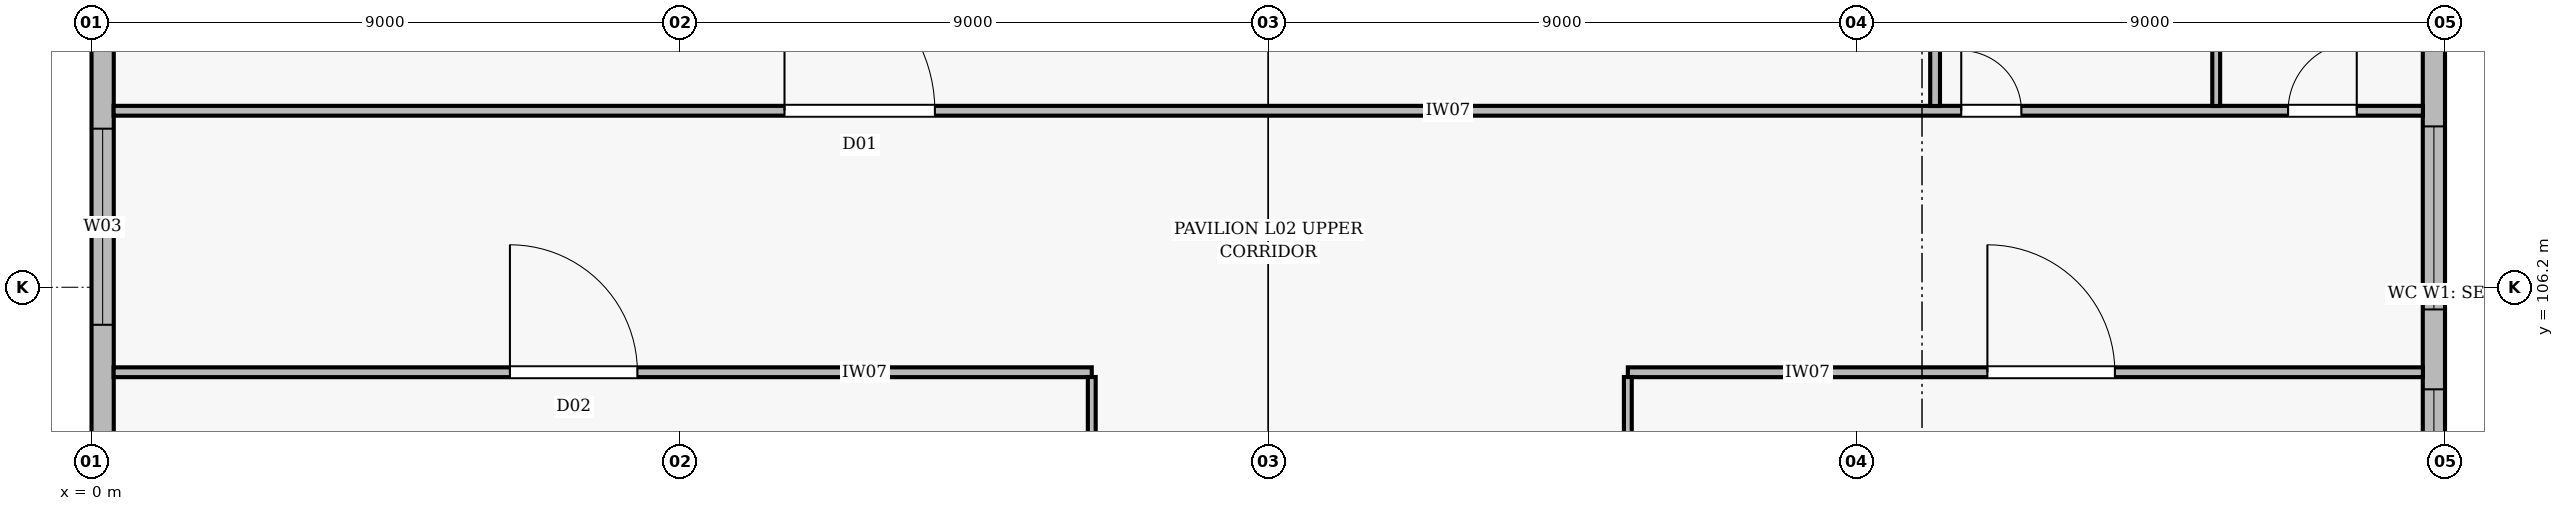
"""IFC4 building model, lengths in metres.
Left out: names, types, materials, properties, quantities, classifications, styles, units other than length and angle.
Written with IfcOpenShell. Run it as: python <this file> out.ifc"""

import sys

from ifc_helpers import new_model, si_unit, direction, frame, frame_2d, origin, place, context, subcontext, project, spatial, rectangle, extrude, element, fill, save


model = new_model("IFC4")
c1 = context("Model", 3, precision=1e-05, world=origin(), true_north=direction((0.0, 1.0)))
c2 = subcontext(c1, "Body", "Model", "MODEL_VIEW")
j1 = project(units=[si_unit("LENGTHUNIT", "METRE"), si_unit("PLANEANGLEUNIT", "RADIAN")], contexts=[c1])
p1 = place(None, origin())
s1 = spatial("IfcSite", under=j1, at=p1, CompositionType="ELEMENT")
p2 = place(p1, origin())
s2 = spatial("IfcBuilding", under=s1, at=p2, CompositionType="ELEMENT")
p3 = place(p2, frame((0.0, 0.0, 12.6)))
s3 = spatial("IfcBuildingStorey", under=s2, at=p3, CompositionType="ELEMENT", Elevation=12.6)
p4 = place(p3, frame((0.17, 100.948, 0.0), z_axis=(0.0, 0.0, 1.0), x_axis=(0.0, 1.0, 0.0)))
e1 = element("IfcWall", 1, at=p4, inside=s3, PredefinedType="STANDARD", context=c2, shape_type="SweptSolid", body=[
    extrude(rectangle(XDim=10.504, YDim=0.34, at=frame_2d((5.252, 0.0))), origin(), (0.0, 0.0, 1.0), 4.22),
])
p5 = place(p4, frame((1.026, 0.0, 0.75)))
e2 = element("IfcOpeningElement", 2, at=p5, cuts=e1, PredefinedType="OPENING", context=c2, shape_type="SweptSolid", body=[
    extrude(rectangle(XDim=1.2, YDim=1.8, at=frame_2d((0.6, 0.9))), frame((0.0, 0.182, 0.0), z_axis=(0.0, -1.0, 0.0), x_axis=(1.0, 0.0, 0.0)), (0.0, 0.0, 1.0), 0.364),
])
p6 = place(p4, frame((4.678, 0.0, 0.75)))
e3 = element("IfcOpeningElement", 3, at=p6, cuts=e1, PredefinedType="OPENING", context=c2, shape_type="SweptSolid", body=[
    extrude(rectangle(XDim=3.0, YDim=2.6, at=frame_2d((1.5, 1.3))), frame((0.0, 0.182, 0.0), z_axis=(0.0, -1.0, 0.0), x_axis=(1.0, 0.0, 0.0)), (0.0, 0.0, 1.0), 0.364),
])
p7 = place(p3, frame((35.83, 100.978, 0.0), z_axis=(0.0, 0.0, 1.0), x_axis=(0.0, 1.0, 0.0)))
e4 = element("IfcWall", 4, at=p7, inside=s3, PredefinedType="STANDARD", context=c2, shape_type="SweptSolid", body=[
    extrude(rectangle(XDim=10.444, YDim=0.34, at=frame_2d((5.222, 0.0))), origin(), (0.0, 0.0, 1.0), 4.22),
])
p8 = place(p7, frame((0.461, 0.0, 0.75)))
e5 = element("IfcOpeningElement", 5, at=p8, cuts=e4, PredefinedType="OPENING", context=c2, shape_type="SweptSolid", body=[
    extrude(rectangle(XDim=3.2, YDim=2.8, at=frame_2d((1.6, 1.4))), frame((0.0, 0.182, 0.0), z_axis=(0.0, -1.0, 0.0), x_axis=(1.0, 0.0, 0.0)), (0.0, 0.0, 1.0), 0.364),
])
p9 = place(p7, frame((4.883, 0.0, 0.75)))
e6 = element("IfcOpeningElement", 6, at=p9, cuts=e4, PredefinedType="OPENING", context=c2, shape_type="SweptSolid", body=[
    extrude(rectangle(XDim=2.8, YDim=2.6, at=frame_2d((1.4, 1.3))), frame((0.0, 0.182, 0.0), z_axis=(0.0, -1.0, 0.0), x_axis=(1.0, 0.0, 0.0)), (0.0, 0.0, 1.0), 0.364),
])
p10 = place(p3, frame((0.338, 104.9, 0.0), z_axis=(0.0, 0.0, 1.0), x_axis=(1.0, 0.0, 0.0)))
e7 = element("IfcWall", 7, at=p10, inside=s3, PredefinedType="PARTITIONING", context=c2, shape_type="SweptSolid", body=[
    extrude(rectangle(XDim=14.962, YDim=0.15, at=frame_2d((7.481, 0.0))), origin(), (0.0, 0.0, 1.0), 4.22),
])
p11 = place(p10, frame((6.062, 0.0, 0.005)))
e8 = element("IfcOpeningElement", 8, at=p11, cuts=e7, PredefinedType="OPENING", context=c2, shape_type="SweptSolid", body=[
    extrude(rectangle(XDim=1.95, YDim=2.3, at=frame_2d((0.975, 1.15))), frame((0.0, 0.087, 0.0), z_axis=(0.0, -1.0, 0.0), x_axis=(1.0, 0.0, 0.0)), (0.0, 0.0, 1.0), 0.174),
])
p12 = place(p3, frame((23.5, 104.9, 0.0), z_axis=(0.0, 0.0, 1.0), x_axis=(1.0, 0.0, 0.0)))
e9 = element("IfcWall", 9, at=p12, inside=s3, PredefinedType="PARTITIONING", context=c2, shape_type="SweptSolid", body=[
    extrude(rectangle(XDim=12.162, YDim=0.15, at=frame_2d((6.081, 0.0))), origin(), (0.0, 0.0, 1.0), 4.22),
])
p13 = place(p12, frame((5.5, 0.0, 0.005)))
e10 = element("IfcOpeningElement", 10, at=p13, cuts=e9, PredefinedType="OPENING", context=c2, shape_type="SweptSolid", body=[
    extrude(rectangle(XDim=1.95, YDim=2.3, at=frame_2d((0.975, 1.15))), frame((0.0, 0.087, 0.0), z_axis=(0.0, -1.0, 0.0), x_axis=(1.0, 0.0, 0.0)), (0.0, 0.0, 1.0), 0.174),
])
p14 = place(p3, frame((0.338, 108.9, 0.0), z_axis=(0.0, 0.0, 1.0), x_axis=(1.0, 0.0, 0.0)))
e11 = element("IfcWall", 11, at=p14, inside=s3, PredefinedType="PARTITIONING", context=c2, shape_type="SweptSolid", body=[
    extrude(rectangle(XDim=35.324, YDim=0.15, at=frame_2d((17.662, 0.0))), origin(), (0.0, 0.0, 1.0), 4.22),
])
p15 = place(p14, frame((10.262, 0.0, 0.005)))
e12 = element("IfcOpeningElement", 12, at=p15, cuts=e11, PredefinedType="OPENING", context=c2, shape_type="SweptSolid", body=[
    extrude(rectangle(XDim=2.3, YDim=2.4, at=frame_2d((1.15, 1.2))), frame((0.0, 0.087, 0.0), z_axis=(0.0, -1.0, 0.0), x_axis=(1.0, 0.0, 0.0)), (0.0, 0.0, 1.0), 0.174),
])
p16 = place(p14, frame((28.262, 0.0, 0.005)))
e13 = element("IfcOpeningElement", 13, at=p16, cuts=e11, PredefinedType="OPENING", context=c2, shape_type="SweptSolid", body=[
    extrude(rectangle(XDim=0.92, YDim=2.12, at=frame_2d((0.46, 1.06))), frame((0.0, 0.087, 0.0), z_axis=(0.0, -1.0, 0.0), x_axis=(1.0, 0.0, 0.0)), (0.0, 0.0, 1.0), 0.174),
])
p17 = place(p14, frame((33.262, 0.0, 0.005)))
e14 = element("IfcOpeningElement", 14, at=p17, cuts=e11, PredefinedType="OPENING", context=c2, shape_type="SweptSolid", body=[
    extrude(rectangle(XDim=1.05, YDim=2.15, at=frame_2d((0.525, 1.075))), frame((0.0, 0.087, 0.0), z_axis=(0.0, -1.0, 0.0), x_axis=(1.0, 0.0, 0.0)), (0.0, 0.0, 1.0), 0.174),
])
for number, where, z_axis, x_axis in (
    (15, (15.3, 90.238, 0.0), (0.0, 0.0, 1.0), (0.0, 1.0, 0.0)),
    (16, (23.5, 90.238, 0.0), (0.0, 0.0, 1.0), (0.0, 1.0, 0.0)),
):
    element("IfcWall", number, at=place(p3, frame(where, z_axis=z_axis, x_axis=x_axis)), inside=s3, PredefinedType="PARTITIONING", context=c2, shape_type="SweptSolid", body=[
        extrude(rectangle(XDim=14.589, YDim=0.12, at=frame_2d((7.294, 0.0))), origin(), (0.0, 0.0, 1.0), 4.22),
    ])
p18 = place(p3, frame((28.2, 108.973, 0.0), z_axis=(0.0, 0.0, 1.0), x_axis=(0.0, 1.0, 0.0)))
e17 = element("IfcWall", 17, at=p18, inside=s3, PredefinedType="PARTITIONING", context=c2, shape_type="SweptSolid", body=[
    extrude(rectangle(XDim=13.189, YDim=0.15, at=frame_2d((6.595, 0.0))), origin(), (0.0, 0.0, 1.0), 4.22),
])
p19 = place(p3, frame((32.5, 108.973, 0.0), z_axis=(0.0, 0.0, 1.0), x_axis=(0.0, 1.0, 0.0)))
e18 = element("IfcWall", 18, at=p19, inside=s3, PredefinedType="PARTITIONING", context=c2, shape_type="SweptSolid", body=[
    extrude(rectangle(XDim=13.189, YDim=0.12, at=frame_2d((6.595, 0.0))), origin(), (0.0, 0.0, 1.0), 4.22),
])
p20 = place(p6, origin())
e19 = element("IfcWindow", 19, at=p20, inside=s3, PartitioningType="DOUBLE_PANEL_VERTICAL", PredefinedType="WINDOW", context=c2, shape_type="SweptSolid", body=[
    extrude(rectangle(XDim=3.0, YDim=2.6, at=frame_2d((1.5, 1.3))), frame((0.0, 0.03, 0.0), z_axis=(0.0, -1.0, 0.0), x_axis=(1.0, 0.0, 0.0)), (0.0, 0.0, 1.0), 0.06),
])
fill(e3, e19)
p21 = place(p8, origin())
e20 = element("IfcWindow", 20, at=p21, inside=s3, PartitioningType="DOUBLE_PANEL_VERTICAL", PredefinedType="WINDOW", context=c2, shape_type="SweptSolid", body=[
    extrude(rectangle(XDim=3.2, YDim=2.8, at=frame_2d((1.6, 1.4))), frame((0.0, 0.03, 0.0), z_axis=(0.0, -1.0, 0.0), x_axis=(1.0, 0.0, 0.0)), (0.0, 0.0, 1.0), 0.06),
])
fill(e5, e20)
p22 = place(p9, origin())
e21 = element("IfcWindow", 21, at=p22, inside=s3, PartitioningType="DOUBLE_PANEL_VERTICAL", PredefinedType="WINDOW", context=c2, shape_type="SweptSolid", body=[
    extrude(rectangle(XDim=2.8, YDim=2.6, at=frame_2d((1.4, 1.3))), frame((0.0, 0.03, 0.0), z_axis=(0.0, -1.0, 0.0), x_axis=(1.0, 0.0, 0.0)), (0.0, 0.0, 1.0), 0.06),
])
fill(e6, e21)
p23 = place(p11, origin())
e22 = element("IfcDoor", 22, at=p23, inside=s3, OperationType="DOUBLE_DOOR_SINGLE_SWING", PredefinedType="DOOR", context=c2, shape_type="SweptSolid", body=[
    extrude(rectangle(XDim=1.95, YDim=2.3, at=frame_2d((0.975, 1.15))), frame((0.0, 0.025, 0.0), z_axis=(0.0, -1.0, 0.0), x_axis=(1.0, 0.0, 0.0)), (0.0, 0.0, 1.0), 0.05),
])
fill(e8, e22)
p24 = place(p13, origin())
e23 = element("IfcDoor", 23, at=p24, inside=s3, OperationType="DOUBLE_DOOR_SINGLE_SWING", PredefinedType="DOOR", context=c2, shape_type="SweptSolid", body=[
    extrude(rectangle(XDim=1.95, YDim=2.3, at=frame_2d((0.975, 1.15))), frame((0.0, 0.025, 0.0), z_axis=(0.0, -1.0, 0.0), x_axis=(1.0, 0.0, 0.0)), (0.0, 0.0, 1.0), 0.05),
])
fill(e10, e23)
p25 = place(p15, origin())
e24 = element("IfcDoor", 24, at=p25, inside=s3, OperationType="DOUBLE_DOOR_SINGLE_SWING", PredefinedType="DOOR", context=c2, shape_type="SweptSolid", body=[
    extrude(rectangle(XDim=2.3, YDim=2.4, at=frame_2d((1.15, 1.2))), frame((0.0, 0.025, 0.0), z_axis=(0.0, -1.0, 0.0), x_axis=(1.0, 0.0, 0.0)), (0.0, 0.0, 1.0), 0.05),
])
fill(e12, e24)
p26 = place(p16, origin())
e25 = element("IfcDoor", 25, at=p26, inside=s3, OperationType="SINGLE_SWING_LEFT", PredefinedType="DOOR", context=c2, shape_type="SweptSolid", body=[
    extrude(rectangle(XDim=0.92, YDim=2.12, at=frame_2d((0.46, 1.06))), frame((0.0, 0.025, 0.0), z_axis=(0.0, -1.0, 0.0), x_axis=(1.0, 0.0, 0.0)), (0.0, 0.0, 1.0), 0.05),
])
fill(e13, e25)
p27 = place(p17, origin())
e26 = element("IfcDoor", 26, at=p27, inside=s3, OperationType="SINGLE_SWING_RIGHT", PredefinedType="DOOR", context=c2, shape_type="SweptSolid", body=[
    extrude(rectangle(XDim=1.05, YDim=2.15, at=frame_2d((0.525, 1.075))), frame((0.0, 0.025, 0.0), z_axis=(0.0, -1.0, 0.0), x_axis=(1.0, 0.0, 0.0)), (0.0, 0.0, 1.0), 0.05),
])
fill(e14, e26)
save(model, sys.argv[1])
